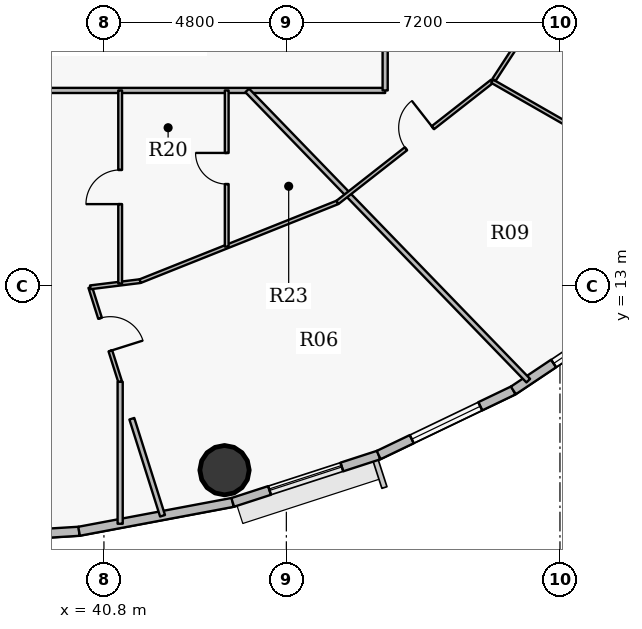
"""IFC4 building model, lengths in metres.
Left out: names, types, materials, properties, quantities, classifications, styles, units other than length and angle.
Written with IfcOpenShell. Run it as: python <this file> out.ifc"""

import sys

from ifc_helpers import new_model, si_unit, direction, frame, frame_2d, origin, origin_2d, place, context, subcontext, project, spatial, rectangle, hollow_circle, extrude, source, transform, mapped, element, fill, save


model = new_model("IFC4")
c1 = context("Model", 3, precision=1e-05, world=origin(), true_north=direction((0.0, 1.0)))
c2 = subcontext(c1, "Body", "Model", "MODEL_VIEW")
j1 = project(units=[si_unit("LENGTHUNIT", "METRE"), si_unit("PLANEANGLEUNIT", "RADIAN")], contexts=[c1])
p1 = place(None, origin())
s1 = spatial("IfcSite", under=j1, at=p1, CompositionType="ELEMENT")
p2 = place(p1, origin())
s2 = spatial("IfcBuilding", under=s1, at=p2, CompositionType="ELEMENT")
p3 = place(p2, frame((0.0, 0.0, 197.4)))
s3 = spatial("IfcBuildingStorey", under=s2, at=p3, CompositionType="ELEMENT", Elevation=197.4)
p4 = place(p3, frame((43.973, 8.159, 0.0), z_axis=(0.0, 0.0, 1.0), x_axis=(1.0, 0.0, 0.0)))
e1 = element("IfcColumn", 1, at=p4, inside=s3, PredefinedType="COLUMN", context=c2, shape_type="SweptSolid", body=[
    extrude(hollow_circle(Radius=0.65, WallThickness=0.04, at=origin_2d()), origin(), (0.0, 0.0, 1.0), 3.75),
])
p5 = place(p3, frame((40.146, 6.551, 0.0), z_axis=(0.0, 0.0, 1.0), x_axis=(-0.998104600619, -0.061540281305, 0.0)))
e2 = element("IfcWall", 2, at=p5, inside=s3, PredefinedType="SOLIDWALL", context=c2, shape_type="SweptSolid", body=[
    extrude(rectangle(XDim=4.154, YDim=0.24, at=frame_2d((2.077, 0.0))), origin(), (0.0, 0.0, 1.0), 3.5),
])
p6 = place(p5, frame((1.077, 0.0, 0.9)))
e3 = element("IfcOpeningElement", 3, at=p6, cuts=e2, PredefinedType="OPENING", context=c2, shape_type="SweptSolid", body=[
    extrude(rectangle(XDim=2.0, YDim=1.75, at=origin_2d()), frame((1.0, 0.13, 0.875), z_axis=(0.0, -1.0, 0.0), x_axis=(1.0, 0.0, 0.0)), (0.0, 0.0, 1.0), 0.26),
])
p7 = place(p3, frame((44.189, 7.311, 0.0), z_axis=(0.0, 0.0, 1.0), x_axis=(-0.982788108205, -0.184736391573, 0.0)))
e4 = element("IfcWall", 4, at=p7, inside=s3, PredefinedType="SOLIDWALL", context=c2, shape_type="SweptSolid", body=[
    extrude(rectangle(XDim=4.114, YDim=0.24, at=frame_2d((2.057, 0.0))), origin(), (0.0, 0.0, 1.0), 3.5),
])
p8 = place(p3, frame((48.03, 8.556, 0.0), z_axis=(0.0, 0.0, 1.0), x_axis=(-0.951209870236, -0.30854462038, 0.0)))
e5 = element("IfcWall", 5, at=p8, inside=s3, PredefinedType="SOLIDWALL", context=c2, shape_type="SweptSolid", body=[
    extrude(rectangle(XDim=4.038, YDim=0.24, at=frame_2d((2.019, 0.0))), origin(), (0.0, 0.0, 1.0), 3.5),
])
p9 = place(p8, frame((1.019, 0.0, 0.9)))
e6 = element("IfcOpeningElement", 6, at=p9, cuts=e5, PredefinedType="OPENING", context=c2, shape_type="SweptSolid", body=[
    extrude(rectangle(XDim=2.0, YDim=1.75, at=origin_2d()), frame((1.0, 0.13, 0.875), z_axis=(0.0, -1.0, 0.0), x_axis=(1.0, 0.0, 0.0)), (0.0, 0.0, 1.0), 0.26),
])
p10 = place(p3, frame((51.573, 10.257, 0.0), z_axis=(0.0, 0.0, 1.0), x_axis=(-0.901564733809, -0.432644231155, 0.0)))
e7 = element("IfcWall", 7, at=p10, inside=s3, PredefinedType="SOLIDWALL", context=c2, shape_type="SweptSolid", body=[
    extrude(rectangle(XDim=3.93, YDim=0.24, at=frame_2d((1.965, 0.0))), origin(), (0.0, 0.0, 1.0), 3.5),
])
p11 = place(p10, frame((0.965, 0.0, 0.9)))
e8 = element("IfcOpeningElement", 8, at=p11, cuts=e7, PredefinedType="OPENING", context=c2, shape_type="SweptSolid", body=[
    extrude(rectangle(XDim=2.0, YDim=1.75, at=origin_2d()), frame((1.0, 0.13, 0.875), z_axis=(0.0, -1.0, 0.0), x_axis=(1.0, 0.0, 0.0)), (0.0, 0.0, 1.0), 0.26),
])
p12 = place(p3, frame((54.732, 12.369, 0.0), z_axis=(0.0, 0.0, 1.0), x_axis=(-0.831228998277, -0.555930168657, 0.0)))
e9 = element("IfcWall", 9, at=p12, inside=s3, PredefinedType="SOLIDWALL", context=c2, shape_type="SweptSolid", body=[
    extrude(rectangle(XDim=3.8, YDim=0.24, at=frame_2d((1.9, 0.0))), origin(), (0.0, 0.0, 1.0), 3.5),
])
p13 = place(p12, frame((1.275, 0.0, 0.9)))
e10 = element("IfcOpeningElement", 10, at=p13, cuts=e9, PredefinedType="OPENING", context=c2, shape_type="SweptSolid", body=[
    extrude(rectangle(XDim=1.25, YDim=1.65, at=origin_2d()), frame((0.625, 0.13, 0.825), z_axis=(0.0, -1.0, 0.0), x_axis=(1.0, 0.0, 0.0)), (0.0, 0.0, 1.0), 0.26),
])
p14 = place(p3, frame((34.605, 18.15, 0.0), z_axis=(0.0, 0.0, 1.0), x_axis=(1.0, 0.0, 0.0)))
e11 = element("IfcWall", 11, at=p14, inside=s3, PredefinedType="PARTITIONING", context=c2, shape_type="SweptSolid", body=[
    extrude(rectangle(XDim=13.595, YDim=0.135, at=frame_2d((6.798, 0.0))), origin(), (0.0, 0.0, 1.0), 2.935),
])
p15 = place(p3, frame((40.44, 12.97, 0.0), z_axis=(0.0, 0.0, 1.0), x_axis=(0.301727202982, -0.953394301945, 0.0)))
e12 = element("IfcWall", 12, at=p15, inside=s3, PredefinedType="PARTITIONING", context=c2, shape_type="SweptSolid", body=[
    extrude(rectangle(XDim=2.608, YDim=0.1, at=frame_2d((1.304, 0.0))), origin(), (0.0, 0.0, 1.0), 3.5),
])
p16 = place(p15, frame((0.854, 0.0, 0.0)))
e13 = element("IfcOpeningElement", 13, at=p16, cuts=e12, PredefinedType="OPENING", context=c2, shape_type="SweptSolid", body=[
    extrude(rectangle(XDim=0.9, YDim=2.1, at=origin_2d()), frame((0.45, 0.06, 1.05), z_axis=(0.0, -1.0, 0.0), x_axis=(1.0, 0.0, 0.0)), (0.0, 0.0, 1.0), 0.12),
])
p17 = place(p3, frame((40.44, 12.97, 0.0), z_axis=(0.0, 0.0, 1.0), x_axis=(0.99240503164, 0.123013223584, 0.0)))
e14 = element("IfcWall", 14, at=p17, inside=s3, PredefinedType="PARTITIONING", context=c2, shape_type="SweptSolid", body=[
    extrude(rectangle(XDim=1.324, YDim=0.1, at=frame_2d((0.662, 0.0))), origin(), (0.0, 0.0, 1.0), 2.935),
])
p18 = place(p3, frame((41.227, 13.067, 0.0), z_axis=(0.0, 0.0, 1.0), x_axis=(0.0, 1.0, 0.0)))
e15 = element("IfcWall", 15, at=p18, inside=s3, PredefinedType="PARTITIONING", context=c2, shape_type="SweptSolid", body=[
    extrude(rectangle(XDim=5.083, YDim=0.1, at=frame_2d((2.541, 0.0))), origin(), (0.0, 0.0, 1.0), 2.935),
])
p19 = place(p18, frame((2.091, 0.0, 0.0)))
e16 = element("IfcOpeningElement", 16, at=p19, cuts=e15, PredefinedType="OPENING", context=c2, shape_type="SweptSolid", body=[
    extrude(rectangle(XDim=0.9, YDim=2.1, at=origin_2d()), frame((0.45, 0.06, 1.05), z_axis=(0.0, -1.0, 0.0), x_axis=(1.0, 0.0, 0.0)), (0.0, 0.0, 1.0), 0.12),
])
p20 = place(p3, frame((41.754, 13.133, 0.0), z_axis=(0.0, 0.0, 1.0), x_axis=(0.928798710424, 0.370584613166, 0.0)))
e17 = element("IfcWall", 17, at=p20, inside=s3, PredefinedType="PARTITIONING", context=c2, shape_type="SweptSolid", body=[
    extrude(rectangle(XDim=5.589, YDim=0.1, at=frame_2d((2.794, 0.0))), origin(), (0.0, 0.0, 1.0), 2.935),
])
p21 = place(p3, frame((44.031, 14.041, 0.0), z_axis=(0.0, 0.0, 1.0), x_axis=(0.0, 1.0, 0.0)))
e18 = element("IfcWall", 18, at=p21, inside=s3, PredefinedType="PARTITIONING", context=c2, shape_type="SweptSolid", body=[
    extrude(rectangle(XDim=4.109, YDim=0.1, at=frame_2d((2.054, 0.0))), origin(), (0.0, 0.0, 1.0), 3.5),
])
p22 = place(p21, frame((1.644, 0.0, 0.0)))
e19 = element("IfcOpeningElement", 19, at=p22, cuts=e18, PredefinedType="OPENING", context=c2, shape_type="SweptSolid", body=[
    extrude(rectangle(XDim=0.82, YDim=2.1, at=origin_2d()), frame((0.41, 0.06, 1.05), z_axis=(0.0, -1.0, 0.0), x_axis=(1.0, 0.0, 0.0)), (0.0, 0.0, 1.0), 0.12),
])
p23 = place(p3, frame((44.571, 18.15, 0.0), z_axis=(0.0, 0.0, 1.0), x_axis=(0.695670435579, -0.718361082647, 0.0)))
e20 = element("IfcWall", 20, at=p23, inside=s3, PredefinedType="PARTITIONING", context=c2, shape_type="SweptSolid", body=[
    extrude(rectangle(XDim=10.63, YDim=0.135, at=frame_2d((5.315, 0.0))), origin(), (0.0, 0.0, 1.0), 2.935),
])
p24 = place(p3, frame((46.945, 15.204, 0.0), z_axis=(0.0, 0.0, 1.0), x_axis=(0.787319701233, 0.616544960282, 0.0)))
e21 = element("IfcWall", 21, at=p24, inside=s3, PredefinedType="PARTITIONING", context=c2, shape_type="SweptSolid", body=[
    extrude(rectangle(XDim=5.172, YDim=0.1, at=frame_2d((2.586, 0.0))), origin(), (0.0, 0.0, 1.0), 2.935),
])
p25 = place(p24, frame((2.289, 0.0, 0.0)))
e22 = element("IfcOpeningElement", 22, at=p25, cuts=e21, PredefinedType="OPENING", context=c2, shape_type="SweptSolid", body=[
    extrude(rectangle(XDim=0.9, YDim=2.1, at=origin_2d()), frame((0.45, 0.06, 1.05), z_axis=(0.0, -1.0, 0.0), x_axis=(1.0, 0.0, 0.0)), (0.0, 0.0, 1.0), 0.12),
])
p26 = place(p3, frame((48.2, 18.15, 0.0), z_axis=(0.0, 0.0, 1.0), x_axis=(0.0, 1.0, 0.0)))
e23 = element("IfcWall", 23, at=p26, inside=s3, PredefinedType="PARTITIONING", context=c2, shape_type="SweptSolid", body=[
    extrude(rectangle(XDim=1.9, YDim=0.135, at=frame_2d((0.95, 0.0))), origin(), (0.0, 0.0, 1.0), 3.5),
])
p27 = place(p3, frame((51.017, 18.393, 0.0), z_axis=(0.0, 0.0, 1.0), x_axis=(0.867591997953, -0.497276708773, 0.0)))
e24 = element("IfcWall", 24, at=p27, inside=s3, PredefinedType="PARTITIONING", context=c2, shape_type="SweptSolid", body=[
    extrude(rectangle(XDim=7.3, YDim=0.1, at=frame_2d((3.65, 0.0))), origin(), (0.0, 0.0, 1.0), 2.935),
])
p28 = place(p3, frame((51.064, 18.429, 0.0), z_axis=(0.0, 0.0, 1.0), x_axis=(0.545382906853, 0.838187022634, 0.0)))
e25 = element("IfcWall", 25, at=p28, inside=s3, PredefinedType="PARTITIONING", context=c2, shape_type="SweptSolid", body=[
    extrude(rectangle(XDim=4.849, YDim=0.1, at=frame_2d((2.425, 0.0))), origin(), (0.0, 0.0, 1.0), 2.935),
])
p29 = place(p28, frame((1.155, 0.0, 0.0)))
e26 = element("IfcOpeningElement", 26, at=p29, cuts=e25, PredefinedType="OPENING", context=c2, shape_type="SweptSolid", body=[
    extrude(rectangle(XDim=0.9, YDim=2.1, at=origin_2d()), frame((0.45, 0.06, 1.05), z_axis=(0.0, -1.0, 0.0), x_axis=(1.0, 0.0, 0.0)), (0.0, 0.0, 1.0), 0.12),
])
p30 = place(p3, frame((52.793, 21.087, 0.0), z_axis=(0.0, 0.0, 1.0), x_axis=(0.94322572083, -0.33215243423, 0.0)))
e27 = element("IfcWall", 27, at=p30, inside=s3, PredefinedType="PARTITIONING", context=c2, shape_type="SweptSolid", body=[
    extrude(rectangle(XDim=7.728, YDim=0.1, at=frame_2d((3.864, 0.0))), origin(), (0.0, 0.0, 1.0), 2.935),
])
p31 = place(p3, frame((41.227, 10.483, 0.0), z_axis=(0.0, 0.0, 1.0), x_axis=(0.0, -1.0, 0.0)))
e28 = element("IfcWall", 28, at=p31, inside=s3, PredefinedType="PARTITIONING", context=c2, shape_type="SweptSolid", body=[
    extrude(rectangle(XDim=3.735, YDim=0.135, at=frame_2d((1.867, 0.0))), origin(), (0.0, 0.0, 1.0), 2.935),
])
p32 = place(p3, frame((42.343, 6.958, 0.0), z_axis=(0.0, 0.0, 1.0), x_axis=(-0.30175084808, 0.953386818496, 0.0)))
e29 = element("IfcWall", 29, at=p32, inside=s3, PredefinedType="PARTITIONING", context=c2, shape_type="SweptSolid", body=[
    extrude(rectangle(XDim=2.678, YDim=0.135, at=frame_2d((1.339, 0.0))), origin(), (0.0, 0.0, 1.0), 2.935),
])
m1 = source(origin(), c2, "Body", "SweptSolid", [
    extrude(rectangle(XDim=2.0, YDim=1.75, at=origin_2d()), frame((1.0, 0.03, 0.875), z_axis=(0.0, -1.0, 0.0), x_axis=(1.0, 0.0, 0.0)), (0.0, 0.0, 1.0), 0.06),
])
p33 = place(p9, origin())
e30 = element("IfcWindow", 30, at=p33, inside=s3, PartitioningType="DOUBLE_PANEL_VERTICAL", PredefinedType="WINDOW", context=c2, shape_type="MappedRepresentation", body=[
    mapped(m1, transform((0.0, 0.0, 0.0), x_axis=(1.0, 0.0, 0.0), y_axis=(0.0, 1.0, 0.0), z_axis=(0.0, 0.0, 1.0), scale=1.0)),
])
fill(e6, e30)
p34 = place(p11, origin())
e31 = element("IfcWindow", 31, at=p34, inside=s3, PartitioningType="DOUBLE_PANEL_VERTICAL", PredefinedType="WINDOW", context=c2, shape_type="MappedRepresentation", body=[
    mapped(m1, transform((0.0, 0.0, 0.0), x_axis=(1.0, 0.0, 0.0), y_axis=(0.0, 1.0, 0.0), z_axis=(0.0, 0.0, 1.0), scale=1.0)),
])
fill(e8, e31)
m2 = source(origin(), c2, "Body", "SweptSolid", [
    extrude(rectangle(XDim=1.25, YDim=1.65, at=origin_2d()), frame((0.625, 0.03, 0.825), z_axis=(0.0, -1.0, 0.0), x_axis=(1.0, 0.0, 0.0)), (0.0, 0.0, 1.0), 0.06),
])
p35 = place(p13, origin())
e32 = element("IfcWindow", 32, at=p35, inside=s3, PartitioningType="SINGLE_PANEL", PredefinedType="WINDOW", context=c2, shape_type="MappedRepresentation", body=[
    mapped(m2, transform((0.0, 0.0, 0.0), x_axis=(1.0, 0.0, 0.0), y_axis=(0.0, 1.0, 0.0), z_axis=(0.0, 0.0, 1.0), scale=1.0)),
])
fill(e10, e32)
m3 = source(origin(), c2, "Body", "SweptSolid", [
    extrude(rectangle(XDim=0.9, YDim=2.1, at=origin_2d()), frame((0.45, 0.025, 1.05), z_axis=(0.0, -1.0, 0.0), x_axis=(1.0, 0.0, 0.0)), (0.0, 0.0, 1.0), 0.05),
])
p36 = place(p16, origin())
e33 = element("IfcDoor", 33, at=p36, inside=s3, OperationType="SINGLE_SWING_RIGHT", PredefinedType="DOOR", context=c2, shape_type="MappedRepresentation", body=[
    mapped(m3, transform((0.0, 0.0, 0.0), x_axis=(1.0, 0.0, 0.0), y_axis=(0.0, 1.0, 0.0), z_axis=(0.0, 0.0, 1.0), scale=1.0)),
])
fill(e13, e33)
p37 = place(p19, origin())
e34 = element("IfcDoor", 34, at=p37, inside=s3, OperationType="SINGLE_SWING_LEFT", PredefinedType="DOOR", context=c2, shape_type="MappedRepresentation", body=[
    mapped(m3, transform((0.0, 0.0, 0.0), x_axis=(1.0, 0.0, 0.0), y_axis=(0.0, 1.0, 0.0), z_axis=(0.0, 0.0, 1.0), scale=1.0)),
])
fill(e16, e34)
m4 = source(origin(), c2, "Body", "SweptSolid", [
    extrude(rectangle(XDim=0.82, YDim=2.1, at=origin_2d()), frame((0.41, 0.025, 1.05), z_axis=(0.0, -1.0, 0.0), x_axis=(1.0, 0.0, 0.0)), (0.0, 0.0, 1.0), 0.05),
])
p38 = place(p22, origin())
e35 = element("IfcDoor", 35, at=p38, inside=s3, OperationType="SINGLE_SWING_RIGHT", PredefinedType="DOOR", context=c2, shape_type="MappedRepresentation", body=[
    mapped(m4, transform((0.0, 0.0, 0.0), x_axis=(1.0, 0.0, 0.0), y_axis=(0.0, 1.0, 0.0), z_axis=(0.0, 0.0, 1.0), scale=1.0)),
])
fill(e19, e35)
p39 = place(p25, origin())
e36 = element("IfcDoor", 36, at=p39, inside=s3, OperationType="SINGLE_SWING_RIGHT", PredefinedType="DOOR", context=c2, shape_type="MappedRepresentation", body=[
    mapped(m3, transform((0.0, 0.0, 0.0), x_axis=(1.0, 0.0, 0.0), y_axis=(0.0, 1.0, 0.0), z_axis=(0.0, 0.0, 1.0), scale=1.0)),
])
fill(e22, e36)
save(model, sys.argv[1])
